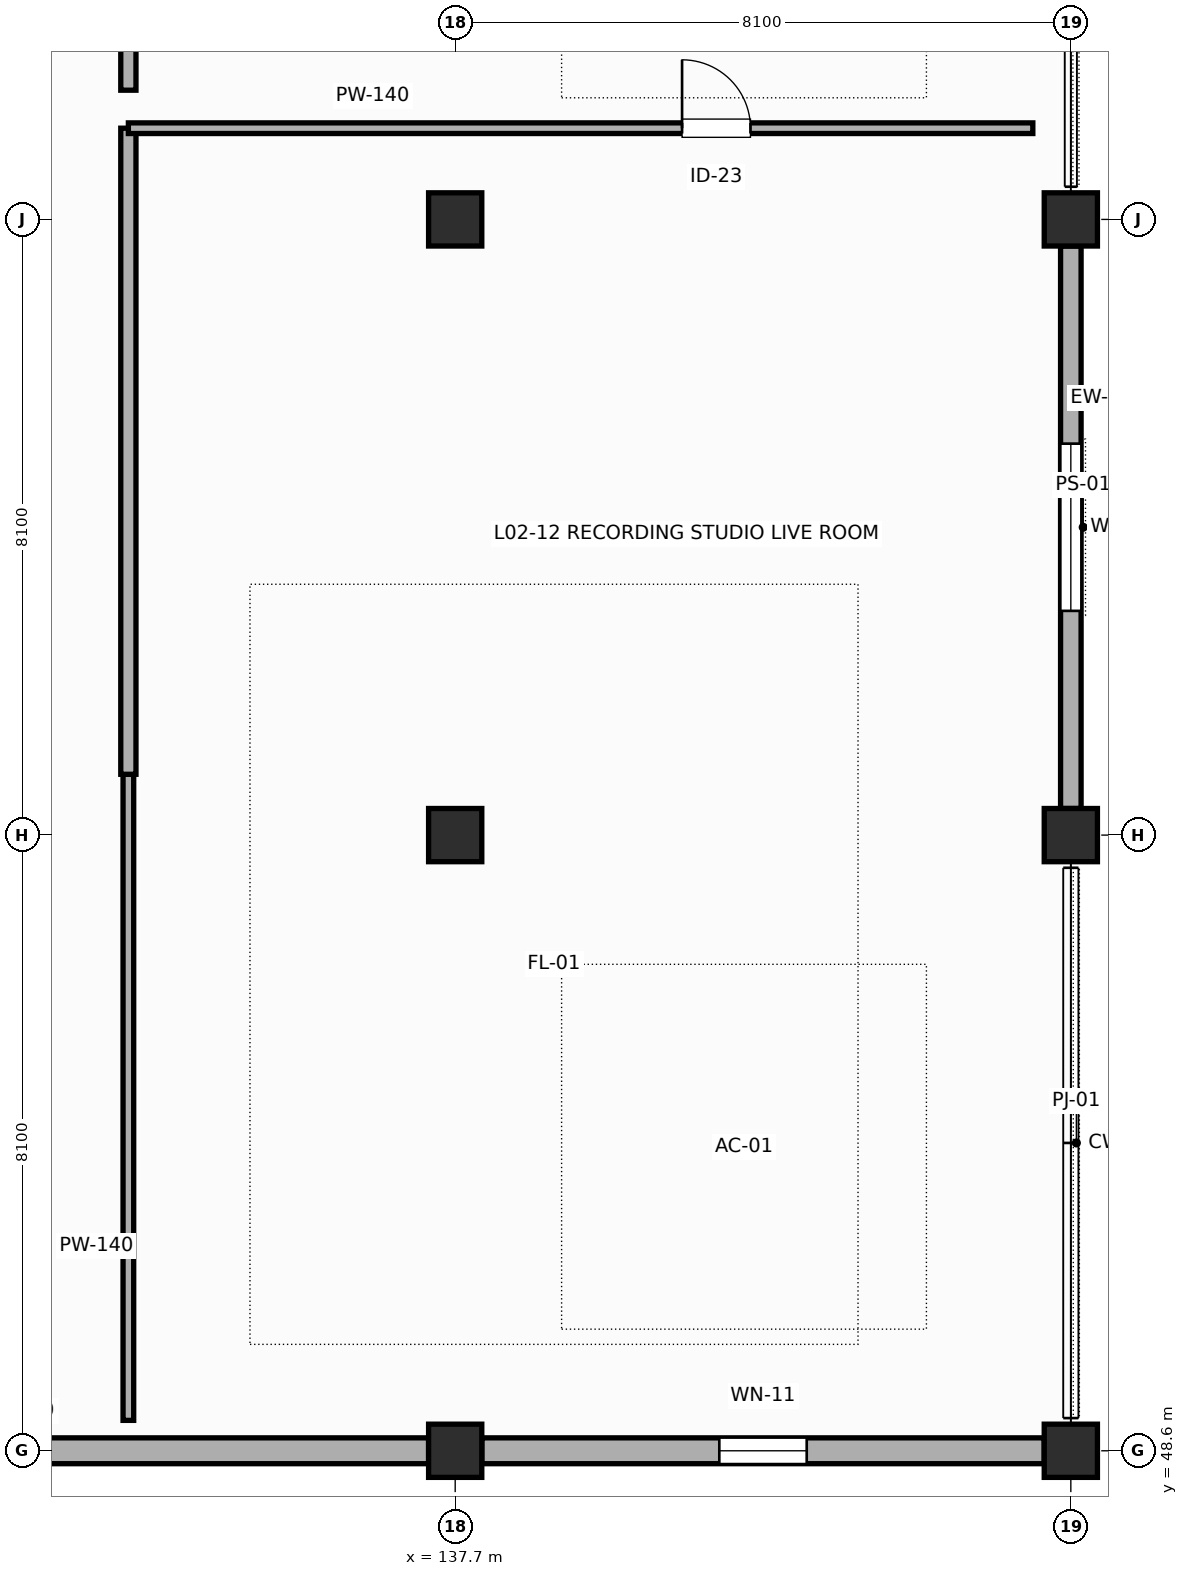
"""IFC4 building model, lengths in metres.
Left out: names, types, materials, properties, quantities, classifications, styles, units other than length and angle.
Written with IfcOpenShell. Run it as: python <this file> out.ifc"""

import sys

from ifc_helpers import new_model, si_unit, direction, frame, frame_2d, origin, origin_2d, place, context, subcontext, project, spatial, rectangle, extrude, element, fill, save


model = new_model("IFC4")
c1 = context("Model", 3, precision=1e-05, world=origin(), true_north=direction((0.0, 1.0)))
c2 = subcontext(c1, "Body", "Model", "MODEL_VIEW")
j1 = project(units=[si_unit("LENGTHUNIT", "METRE"), si_unit("PLANEANGLEUNIT", "RADIAN")], contexts=[c1])
p1 = place(None, origin())
s1 = spatial("IfcSite", under=j1, at=p1, CompositionType="ELEMENT")
p2 = place(p1, origin())
s2 = spatial("IfcBuilding", under=s1, at=p2, CompositionType="ELEMENT")
p3 = place(p2, frame((0.0, 0.0, 10.2)))
s3 = spatial("IfcBuildingStorey", under=s2, at=p3, CompositionType="ELEMENT", Elevation=10.2)
for number, where, z_axis, x_axis in (
    (1, (137.7, 48.6, 0.0), (0.0, 0.0, 1.0), (1.0, 0.0, 0.0)),
    (2, (137.7, 56.7, 0.0), (0.0, 0.0, 1.0), (1.0, 0.0, 0.0)),
    (3, (137.7, 64.8, 0.0), (0.0, 0.0, 1.0), (1.0, 0.0, 0.0)),
    (4, (145.8, 48.6, 0.0), (0.0, 0.0, 1.0), (1.0, 0.0, 0.0)),
    (5, (145.8, 56.7, 0.0), (0.0, 0.0, 1.0), (1.0, 0.0, 0.0)),
    (6, (145.8, 64.8, 0.0), (0.0, 0.0, 1.0), (1.0, 0.0, 0.0)),
):
    element("IfcColumn", number, at=place(p3, frame(where, z_axis=z_axis, x_axis=x_axis)), inside=s3, PredefinedType="COLUMN", context=c2, shape_type="SweptSolid", body=[
        extrude(rectangle(XDim=0.7, YDim=0.7, at=origin_2d()), origin(), (0.0, 0.0, 1.0), 4.8),
    ])
p4 = place(p3, frame((145.8, 64.45, 0.0), z_axis=(0.0, 0.0, 1.0), x_axis=(0.0, -1.0, 0.0)))
e7 = element("IfcWall", 7, at=p4, inside=s3, PredefinedType="SOLIDWALL", context=c2, shape_type="SweptSolid", body=[
    extrude(rectangle(XDim=7.4, YDim=0.27, at=frame_2d((3.7, 0.0))), origin(), (0.0, 0.0, 1.0), 4.187),
])
p5 = place(p4, frame((2.6, 0.0, 0.9)))
e8 = element("IfcOpeningElement", 8, at=p5, cuts=e7, PredefinedType="OPENING", context=c2, shape_type="SweptSolid", body=[
    extrude(rectangle(XDim=2.2, YDim=1.5, at=frame_2d((1.1, 0.75))), frame((0.0, 0.145, 0.0), z_axis=(0.0, -1.0, 0.0), x_axis=(1.0, 0.0, 0.0)), (0.0, 0.0, 1.0), 0.29),
])
p6 = place(p3, frame((129.95, 48.6, 0.0), z_axis=(0.0, 0.0, 1.0), x_axis=(1.0, 0.0, 0.0)))
e9 = element("IfcWall", 9, at=p6, inside=s3, PredefinedType="SOLIDWALL", context=c2, shape_type="SweptSolid", body=[
    extrude(rectangle(XDim=7.4, YDim=0.34, at=frame_2d((3.7, 0.0))), origin(), (0.0, 0.0, 1.0), 4.075),
])
p7 = place(p3, frame((138.05, 48.6, 0.0), z_axis=(0.0, 0.0, 1.0), x_axis=(1.0, 0.0, 0.0)))
e10 = element("IfcWall", 10, at=p7, inside=s3, PredefinedType="SOLIDWALL", context=c2, shape_type="SweptSolid", body=[
    extrude(rectangle(XDim=7.4, YDim=0.34, at=frame_2d((3.7, 0.0))), origin(), (0.0, 0.0, 1.0), 4.127),
])
p8 = place(p7, frame((3.125, 0.0, 0.9)))
e11 = element("IfcOpeningElement", 11, at=p8, cuts=e10, PredefinedType="OPENING", context=c2, shape_type="SweptSolid", body=[
    extrude(rectangle(XDim=1.15, YDim=1.7, at=frame_2d((0.575, 0.85))), frame((0.0, 0.18, 0.0), z_axis=(0.0, -1.0, 0.0), x_axis=(1.0, 0.0, 0.0)), (0.0, 0.0, 1.0), 0.36),
])
p9 = place(p3, frame((133.4, 49.0, 0.0), z_axis=(0.0, 0.0, 1.0), x_axis=(0.0, 1.0, 0.0)))
e12 = element("IfcWall", 12, at=p9, inside=s3, PredefinedType="PARTITIONING", context=c2, shape_type="SweptSolid", body=[
    extrude(rectangle(XDim=8.5, YDim=0.14, at=frame_2d((4.25, 0.0))), origin(), (0.0, 0.0, 1.0), 4.52),
])
p10 = place(p3, frame((133.4, 57.5, 0.0), z_axis=(0.0, 0.0, 1.0), x_axis=(0.0, 1.0, 0.0)))
e13 = element("IfcWall", 13, at=p10, inside=s3, PredefinedType="PARTITIONING", context=c2, shape_type="SweptSolid", body=[
    extrude(rectangle(XDim=8.5, YDim=0.2, at=frame_2d((4.25, 0.0))), origin(), (0.0, 0.0, 1.0), 4.52),
])
p11 = place(p3, frame((133.4, 66.0, 0.0), z_axis=(0.0, 0.0, 1.0), x_axis=(1.0, 0.0, 0.0)))
e14 = element("IfcWall", 14, at=p11, inside=s3, PredefinedType="PARTITIONING", context=c2, shape_type="SweptSolid", body=[
    extrude(rectangle(XDim=11.9, YDim=0.14, at=frame_2d((5.95, 0.0))), origin(), (0.0, 0.0, 1.0), 4.52),
])
p12 = place(p11, frame((7.285, 0.0, 0.0)))
e15 = element("IfcOpeningElement", 15, at=p12, cuts=e14, PredefinedType="OPENING", context=c2, shape_type="SweptSolid", body=[
    extrude(rectangle(XDim=0.9, YDim=2.2, at=frame_2d((0.45, 1.1))), frame((0.0, 0.08, 0.0), z_axis=(0.0, -1.0, 0.0), x_axis=(1.0, 0.0, 0.0)), (0.0, 0.0, 1.0), 0.16),
])
p13 = place(p3, frame((133.4, 66.5, 0.0), z_axis=(0.0, 0.0, 1.0), x_axis=(0.0, 1.0, 0.0)))
e16 = element("IfcWall", 16, at=p13, inside=s3, PredefinedType="PARTITIONING", context=c2, shape_type="SweptSolid", body=[
    extrude(rectangle(XDim=9.5, YDim=0.2, at=frame_2d((4.75, 0.0))), origin(), (0.0, 0.0, 1.0), 4.52),
])
p14 = place(p5, origin())
e17 = element("IfcWindow", 17, at=p14, inside=s3, PartitioningType="SINGLE_PANEL", PredefinedType="WINDOW", context=c2, shape_type="SweptSolid", body=[
    extrude(rectangle(XDim=2.2, YDim=1.5, at=frame_2d((1.1, 0.75))), frame((0.0, 0.03, 0.0), z_axis=(0.0, -1.0, 0.0), x_axis=(1.0, 0.0, 0.0)), (0.0, 0.0, 1.0), 0.06),
])
fill(e8, e17)
p15 = place(p8, origin())
e18 = element("IfcWindow", 18, at=p15, inside=s3, PartitioningType="SINGLE_PANEL", PredefinedType="WINDOW", context=c2, shape_type="SweptSolid", body=[
    extrude(rectangle(XDim=1.15, YDim=1.7, at=frame_2d((0.575, 0.85))), frame((0.0, 0.03, 0.0), z_axis=(0.0, -1.0, 0.0), x_axis=(1.0, 0.0, 0.0)), (0.0, 0.0, 1.0), 0.06),
])
fill(e11, e18)
p16 = place(p12, origin())
e19 = element("IfcDoor", 19, at=p16, inside=s3, OperationType="SINGLE_SWING_LEFT", PredefinedType="DOOR", context=c2, shape_type="SweptSolid", body=[
    extrude(rectangle(XDim=0.9, YDim=2.2, at=frame_2d((0.45, 1.1))), frame((0.0, 0.025, 0.0), z_axis=(0.0, -1.0, 0.0), x_axis=(1.0, 0.0, 0.0)), (0.0, 0.0, 1.0), 0.05),
])
fill(e15, e19)
save(model, sys.argv[1])
